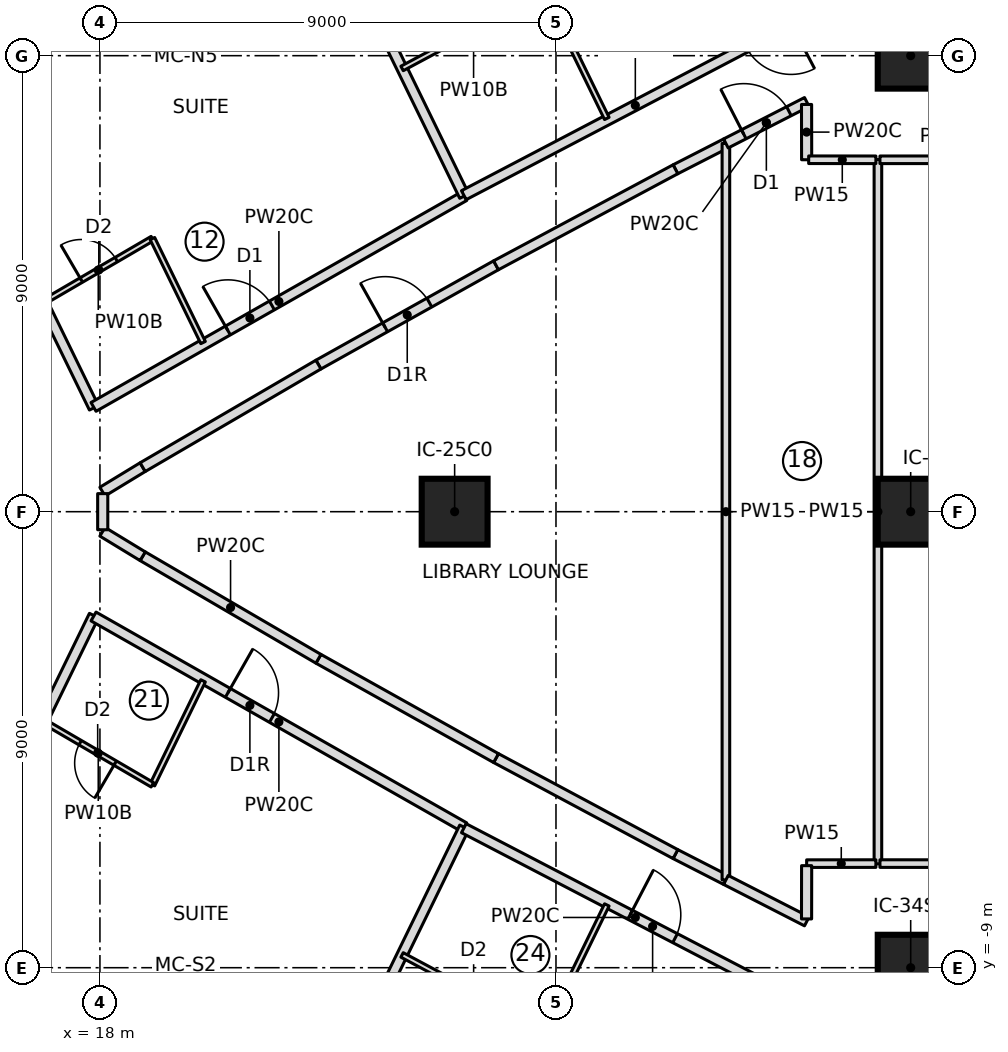
"""IFC4 building model, lengths in metres.
Left out: names, types, materials, properties, quantities, classifications, styles, units other than length and angle.
Written with IfcOpenShell. Run it as: python <this file> out.ifc"""

import sys

from ifc_helpers import new_model, si_unit, direction, frame, frame_2d, origin, origin_2d, place, context, subcontext, project, spatial, rectangle, extrude, element, fill, save


model = new_model("IFC4")
c1 = context("Model", 3, precision=1e-05, world=origin(), true_north=direction((0.0, 1.0)))
c2 = subcontext(c1, "Body", "Model", "MODEL_VIEW")
j1 = project(units=[si_unit("LENGTHUNIT", "METRE"), si_unit("PLANEANGLEUNIT", "RADIAN")], contexts=[c1])
p1 = place(None, origin())
s1 = spatial("IfcSite", under=j1, at=p1, CompositionType="ELEMENT")
p2 = place(p1, origin())
s2 = spatial("IfcBuilding", under=s1, at=p2, CompositionType="ELEMENT")
p3 = place(p2, frame((0.0, 0.0, 50.25)))
s3 = spatial("IfcBuildingStorey", under=s2, at=p3, CompositionType="ELEMENT", Elevation=50.25)
for number, where, z_axis, x_axis in (
    (1, (25.0, 0.0, 0.0), (0.0, 0.0, 1.0), (1.0, 0.0, 0.0)),
    (2, (34.0, -9.0, 0.0), (0.0, 0.0, 1.0), (1.0, 0.0, 0.0)),
    (3, (34.0, 0.0, 0.0), (0.0, 0.0, 1.0), (1.0, 0.0, 0.0)),
    (4, (34.0, 9.0, 0.0), (0.0, 0.0, 1.0), (1.0, 0.0, 0.0)),
):
    element("IfcColumn", number, at=place(p3, frame(where, z_axis=z_axis, x_axis=x_axis)), inside=s3, PredefinedType="COLUMN", context=c2, shape_type="SweptSolid", body=[
        extrude(rectangle(XDim=1.3, YDim=1.3, at=origin_2d()), origin(), (0.0, 0.0, 1.0), 3.55),
    ])
p4 = place(p3, frame((17.882, 2.05, 0.0), z_axis=(0.0, 0.0, 1.0), x_axis=(-0.438213564788, 0.898870887078, 0.0)))
e5 = element("IfcWall", 5, at=p4, inside=s3, PredefinedType="PARTITIONING", context=c2, shape_type="SweptSolid", body=[
    extrude(rectangle(XDim=7.625, YDim=0.2, at=frame_2d((3.813, 0.0))), origin(), (0.0, 0.0, 1.0), 3.25),
])
p5 = place(p3, frame((17.874, 2.068, 0.0), z_axis=(0.0, 0.0, 1.0), x_axis=(0.869280098963, 0.494319845391, 0.0)))
e6 = element("IfcWall", 6, at=p5, inside=s3, PredefinedType="PARTITIONING", context=c2, shape_type="SweptSolid", body=[
    extrude(rectangle(XDim=8.417, YDim=0.2, at=frame_2d((4.208, 0.0))), origin(), (0.0, 0.0, 1.0), 3.25),
])
p6 = place(p5, frame((3.05, 0.0, 0.0)))
e7 = element("IfcOpeningElement", 7, at=p6, cuts=e6, PredefinedType="OPENING", context=c2, shape_type="SweptSolid", body=[
    extrude(rectangle(XDim=1.0, YDim=2.1, at=frame_2d((0.5, 1.05))), frame((0.0, 0.11, 0.0), z_axis=(0.0, -1.0, 0.0), x_axis=(1.0, 0.0, 0.0)), (0.0, 0.0, 1.0), 0.22),
])
p7 = place(p3, frame((16.898, 4.144, 0.0), z_axis=(0.0, 0.0, 1.0), x_axis=(0.863707305865, 0.503993739837, 0.0)))
e8 = element("IfcWall", 8, at=p7, inside=s3, PredefinedType="PARTITIONING", context=c2, shape_type="SweptSolid", body=[
    extrude(rectangle(XDim=2.474, YDim=0.1, at=frame_2d((1.237, 0.0))), origin(), (0.0, 0.0, 1.0), 3.25),
])
p8 = place(p7, frame((0.85, 0.0, 0.0)))
e9 = element("IfcOpeningElement", 9, at=p8, cuts=e8, PredefinedType="OPENING", context=c2, shape_type="SweptSolid", body=[
    extrude(rectangle(XDim=0.8, YDim=2.1, at=frame_2d((0.4, 1.05))), frame((0.0, 0.06, 0.0), z_axis=(0.0, -1.0, 0.0), x_axis=(1.0, 0.0, 0.0)), (0.0, 0.0, 1.0), 0.12),
])
p9 = place(p3, frame((19.035, 5.39, 0.0), z_axis=(0.0, 0.0, 1.0), x_axis=(0.438122322582, -0.898915363344, 0.0)))
e10 = element("IfcWall", 10, at=p9, inside=s3, PredefinedType="PARTITIONING", context=c2, shape_type="SweptSolid", body=[
    extrude(rectangle(XDim=2.283, YDim=0.1, at=frame_2d((1.142, 0.0))), origin(), (0.0, 0.0, 1.0), 3.25),
])
p10 = place(p3, frame((25.19, 6.229, 0.0), z_axis=(0.0, 0.0, 1.0), x_axis=(-0.438202895602, 0.898876088394, 0.0)))
e11 = element("IfcWall", 11, at=p10, inside=s3, PredefinedType="PARTITIONING", context=c2, shape_type="SweptSolid", body=[
    extrude(rectangle(XDim=7.605, YDim=0.2, at=frame_2d((3.803, 0.0))), origin(), (0.0, 0.0, 1.0), 3.25),
])
p11 = place(p3, frame((31.95, 9.792, 0.0), z_axis=(0.0, 0.0, 1.0), x_axis=(-0.88581965272, -0.464029678851, 0.0)))
e12 = element("IfcWall", 12, at=p11, inside=s3, PredefinedType="PARTITIONING", context=c2, shape_type="SweptSolid", body=[
    extrude(rectangle(XDim=7.641, YDim=0.2, at=frame_2d((3.821, 0.0))), origin(), (0.0, 0.0, 1.0), 3.25),
])
p12 = place(p11, frame((0.35, 0.0, 0.0)))
e13 = element("IfcOpeningElement", 13, at=p12, cuts=e12, PredefinedType="OPENING", context=c2, shape_type="SweptSolid", body=[
    extrude(rectangle(XDim=1.0, YDim=2.1, at=frame_2d((0.5, 1.05))), frame((0.0, 0.11, 0.0), z_axis=(0.0, -1.0, 0.0), x_axis=(1.0, 0.0, 0.0)), (0.0, 0.0, 1.0), 0.22),
])
p13 = place(p3, frame((23.962, 8.748, 0.0), z_axis=(0.0, 0.0, 1.0), x_axis=(0.881653338438, 0.471897648672, 0.0)))
e14 = element("IfcWall", 14, at=p13, inside=s3, PredefinedType="PARTITIONING", context=c2, shape_type="SweptSolid", body=[
    extrude(rectangle(XDim=3.202, YDim=0.1, at=frame_2d((1.601, 0.0))), origin(), (0.0, 0.0, 1.0), 3.25),
])
p14 = place(p13, frame((1.2, 0.0, 0.0)))
e15 = element("IfcOpeningElement", 15, at=p14, cuts=e14, PredefinedType="OPENING", context=c2, shape_type="SweptSolid", body=[
    extrude(rectangle(XDim=0.8, YDim=2.1, at=frame_2d((0.4, 1.05))), frame((0.0, 0.06, 0.0), z_axis=(0.0, -1.0, 0.0), x_axis=(1.0, 0.0, 0.0)), (0.0, 0.0, 1.0), 0.12),
])
p15 = place(p3, frame((26.786, 10.259, 0.0), z_axis=(0.0, 0.0, 1.0), x_axis=(0.43822975423, -0.898862994292, 0.0)))
e16 = element("IfcWall", 16, at=p15, inside=s3, PredefinedType="PARTITIONING", context=c2, shape_type="SweptSolid", body=[
    extrude(rectangle(XDim=2.779, YDim=0.1, at=frame_2d((1.389, 0.0))), origin(), (0.0, 0.0, 1.0), 3.25),
])
p16 = place(p3, frame((14.541, -8.904, 0.0), z_axis=(0.0, 0.0, 1.0), x_axis=(0.438213564788, 0.898870887078, 0.0)))
e17 = element("IfcWall", 17, at=p16, inside=s3, PredefinedType="PARTITIONING", context=c2, shape_type="SweptSolid", body=[
    extrude(rectangle(XDim=7.625, YDim=0.2, at=frame_2d((3.813, 0.0))), origin(), (0.0, 0.0, 1.0), 3.25),
])
p17 = place(p3, frame((17.874, -2.068, 0.0), z_axis=(0.0, 0.0, 1.0), x_axis=(0.869280098963, -0.494319845391, 0.0)))
e18 = element("IfcWall", 18, at=p17, inside=s3, PredefinedType="PARTITIONING", context=c2, shape_type="SweptSolid", body=[
    extrude(rectangle(XDim=8.417, YDim=0.2, at=frame_2d((4.208, 0.0))), origin(), (0.0, 0.0, 1.0), 3.25),
])
p18 = place(p17, frame((3.05, 0.0, 0.0)))
e19 = element("IfcOpeningElement", 19, at=p18, cuts=e18, PredefinedType="OPENING", context=c2, shape_type="SweptSolid", body=[
    extrude(rectangle(XDim=1.0, YDim=2.1, at=frame_2d((0.5, 1.05))), frame((0.0, 0.11, 0.0), z_axis=(0.0, -1.0, 0.0), x_axis=(1.0, 0.0, 0.0)), (0.0, 0.0, 1.0), 0.22),
])
p19 = place(p3, frame((20.035, -3.338, 0.0), z_axis=(0.0, 0.0, 1.0), x_axis=(-0.438122322582, -0.898915363344, 0.0)))
e20 = element("IfcWall", 20, at=p19, inside=s3, PredefinedType="PARTITIONING", context=c2, shape_type="SweptSolid", body=[
    extrude(rectangle(XDim=2.283, YDim=0.1, at=frame_2d((1.142, 0.0))), origin(), (0.0, 0.0, 1.0), 3.25),
])
p20 = place(p3, frame((19.035, -5.39, 0.0), z_axis=(0.0, 0.0, 1.0), x_axis=(-0.863707305865, 0.503993739837, 0.0)))
e21 = element("IfcWall", 21, at=p20, inside=s3, PredefinedType="PARTITIONING", context=c2, shape_type="SweptSolid", body=[
    extrude(rectangle(XDim=2.474, YDim=0.1, at=frame_2d((1.237, 0.0))), origin(), (0.0, 0.0, 1.0), 3.25),
])
p21 = place(p20, frame((0.85, 0.0, 0.0)))
e22 = element("IfcOpeningElement", 22, at=p21, cuts=e21, PredefinedType="OPENING", context=c2, shape_type="SweptSolid", body=[
    extrude(rectangle(XDim=0.8, YDim=2.1, at=frame_2d((0.4, 1.05))), frame((0.0, 0.06, 0.0), z_axis=(0.0, -1.0, 0.0), x_axis=(1.0, 0.0, 0.0)), (0.0, 0.0, 1.0), 0.12),
])
p22 = place(p3, frame((21.857, -13.065, 0.0), z_axis=(0.0, 0.0, 1.0), x_axis=(0.438202895602, 0.898876088394, 0.0)))
e23 = element("IfcWall", 23, at=p22, inside=s3, PredefinedType="PARTITIONING", context=c2, shape_type="SweptSolid", body=[
    extrude(rectangle(XDim=7.605, YDim=0.2, at=frame_2d((3.803, 0.0))), origin(), (0.0, 0.0, 1.0), 3.25),
])
p23 = place(p3, frame((25.181, -6.247, 0.0), z_axis=(0.0, 0.0, 1.0), x_axis=(0.887026569793, -0.461718382221, 0.0)))
e24 = element("IfcWall", 24, at=p23, inside=s3, PredefinedType="PARTITIONING", context=c2, shape_type="SweptSolid", body=[
    extrude(rectangle(XDim=7.631, YDim=0.2, at=frame_2d((3.815, 0.0))), origin(), (0.0, 0.0, 1.0), 3.25),
])
p24 = place(p23, frame((3.7, 0.0, 0.0)))
e25 = element("IfcOpeningElement", 25, at=p24, cuts=e24, PredefinedType="OPENING", context=c2, shape_type="SweptSolid", body=[
    extrude(rectangle(XDim=1.0, YDim=2.1, at=frame_2d((0.5, 1.05))), frame((0.0, 0.11, 0.0), z_axis=(0.0, -1.0, 0.0), x_axis=(1.0, 0.0, 0.0)), (0.0, 0.0, 1.0), 0.22),
])
p25 = place(p3, frame((28.003, -7.761, 0.0), z_axis=(0.0, 0.0, 1.0), x_axis=(-0.43822975423, -0.898862994292, 0.0)))
e26 = element("IfcWall", 26, at=p25, inside=s3, PredefinedType="PARTITIONING", context=c2, shape_type="SweptSolid", body=[
    extrude(rectangle(XDim=2.779, YDim=0.1, at=frame_2d((1.389, 0.0))), origin(), (0.0, 0.0, 1.0), 3.25),
])
p26 = place(p3, frame((26.785, -10.259, 0.0), z_axis=(0.0, 0.0, 1.0), x_axis=(-0.881653338438, 0.471897648672, 0.0)))
e27 = element("IfcWall", 27, at=p26, inside=s3, PredefinedType="PARTITIONING", context=c2, shape_type="SweptSolid", body=[
    extrude(rectangle(XDim=3.202, YDim=0.1, at=frame_2d((1.601, 0.0))), origin(), (0.0, 0.0, 1.0), 3.25),
])
p27 = place(p26, frame((1.2, 0.0, 0.0)))
e28 = element("IfcOpeningElement", 28, at=p27, cuts=e27, PredefinedType="OPENING", context=c2, shape_type="SweptSolid", body=[
    extrude(rectangle(XDim=0.8, YDim=2.1, at=frame_2d((0.4, 1.05))), frame((0.0, 0.06, 0.0), z_axis=(0.0, -1.0, 0.0), x_axis=(1.0, 0.0, 0.0)), (0.0, 0.0, 1.0), 0.12),
])
p28 = place(p3, frame((22.312, 2.903, 0.0), z_axis=(0.0, 0.0, 1.0), x_axis=(0.872800289292, 0.488077509225, 0.0)))
e29 = element("IfcWall", 29, at=p28, inside=s3, PredefinedType="PARTITIONING", context=c2, shape_type="SweptSolid", body=[
    extrude(rectangle(XDim=4.016, YDim=0.2, at=frame_2d((2.008, 0.0))), origin(), (0.0, 0.0, 1.0), 3.25),
])
p29 = place(p28, frame((1.508, 0.0, 0.0)))
e30 = element("IfcOpeningElement", 30, at=p29, cuts=e29, PredefinedType="OPENING", context=c2, shape_type="SweptSolid", body=[
    extrude(rectangle(XDim=1.0, YDim=2.1, at=frame_2d((0.5, 1.05))), frame((0.0, 0.11, 0.0), z_axis=(0.0, -1.0, 0.0), x_axis=(1.0, 0.0, 0.0)), (0.0, 0.0, 1.0), 0.22),
])
for number, where, z_axis, x_axis in (
    (31, (29.357, 6.758, 0.0), (0.0, 0.0, 1.0), (0.89, 0.455, 0.0)),
    (32, (30.353, -7.268, 0.0), (0.0, 0.0, 1.0), (-0.89, 0.455, 0.0)),
):
    element("IfcWall", number, at=place(p3, frame(where, z_axis=z_axis, x_axis=x_axis)), inside=s3, PredefinedType="PARTITIONING", context=c2, shape_type="SweptSolid", body=[
        extrude(rectangle(XDim=1.119, YDim=0.2, at=frame_2d((0.559, 0.0))), origin(), (0.0, 0.0, 1.0), 3.25),
    ])
p30 = place(p3, frame((29.357, -6.758, 0.0), z_axis=(0.0, 0.0, 1.0), x_axis=(-0.881655245922, 0.471894084874, 0.0)))
e33 = element("IfcWall", 33, at=p30, inside=s3, PredefinedType="PARTITIONING", context=c2, shape_type="SweptSolid", body=[
    extrude(rectangle(XDim=4.016, YDim=0.2, at=frame_2d((2.008, 0.0))), origin(), (0.0, 0.0, 1.0), 3.25),
])
p31 = place(p3, frame((25.817, -4.863, 0.0), z_axis=(0.0, 0.0, 1.0), x_axis=(-0.872800289292, 0.488077509225, 0.0)))
e34 = element("IfcWall", 34, at=p31, inside=s3, PredefinedType="PARTITIONING", context=c2, shape_type="SweptSolid", body=[
    extrude(rectangle(XDim=4.016, YDim=0.2, at=frame_2d((2.008, 0.0))), origin(), (0.0, 0.0, 1.0), 3.25),
])
p32 = place(p3, frame((22.312, -2.903, 0.0), z_axis=(0.0, 0.0, 1.0), x_axis=(-0.863710538269, 0.503988200341, 0.0)))
e35 = element("IfcWall", 35, at=p32, inside=s3, PredefinedType="PARTITIONING", context=c2, shape_type="SweptSolid", body=[
    extrude(rectangle(XDim=4.016, YDim=0.2, at=frame_2d((2.008, 0.0))), origin(), (0.0, 0.0, 1.0), 3.25),
])
for number, where, z_axis, x_axis in (
    (36, (18.844, -0.879, 0.0), (0.0, 0.0, 1.0), (-0.854, 0.52, 0.0)),
    (37, (18.05, 0.396, 0.0), (0.0, 0.0, 1.0), (0.854, 0.52, 0.0)),
):
    element("IfcWall", number, at=place(p3, frame(where, z_axis=z_axis, x_axis=x_axis)), inside=s3, PredefinedType="PARTITIONING", context=c2, shape_type="SweptSolid", body=[
        extrude(rectangle(XDim=0.929, YDim=0.2, at=frame_2d((0.464, 0.0))), origin(), (0.0, 0.0, 1.0), 3.25),
    ])
for number, where, z_axis, x_axis in (
    (38, (18.844, 0.879, 0.0), (0.0, 0.0, 1.0), (0.864, 0.504, 0.0)),
    (39, (25.817, 4.863, 0.0), (0.0, 0.0, 1.0), (0.882, 0.472, 0.0)),
):
    element("IfcWall", number, at=place(p3, frame(where, z_axis=z_axis, x_axis=x_axis)), inside=s3, PredefinedType="PARTITIONING", context=c2, shape_type="SweptSolid", body=[
        extrude(rectangle(XDim=4.016, YDim=0.2, at=frame_2d((2.008, 0.0))), origin(), (0.0, 0.0, 1.0), 3.25),
    ])
p33 = place(p3, frame((30.353, -7.268, 0.0), z_axis=(0.0, 0.0, 1.0), x_axis=(0.0, 1.0, 0.0)))
e40 = element("IfcWall", 40, at=p33, inside=s3, PredefinedType="PARTITIONING", context=c2, shape_type="SweptSolid", body=[
    extrude(rectangle(XDim=14.535, YDim=0.15, at=frame_2d((7.268, 0.0))), origin(), (0.0, 0.0, 1.0), 3.25),
])
p34 = place(p3, frame((30.353, 7.268, 0.0), z_axis=(0.0, 0.0, 1.0), x_axis=(0.890195531144, 0.455578660969, 0.0)))
e41 = element("IfcWall", 41, at=p34, inside=s3, PredefinedType="PARTITIONING", context=c2, shape_type="SweptSolid", body=[
    extrude(rectangle(XDim=1.794, YDim=0.2, at=frame_2d((0.897, 0.0))), origin(), (0.0, 0.0, 1.0), 3.25),
])
p35 = place(p34, frame((0.397, 0.0, 0.0)))
e42 = element("IfcOpeningElement", 42, at=p35, cuts=e41, PredefinedType="OPENING", context=c2, shape_type="SweptSolid", body=[
    extrude(rectangle(XDim=1.0, YDim=2.1, at=frame_2d((0.5, 1.05))), frame((0.0, 0.11, 0.0), z_axis=(0.0, -1.0, 0.0), x_axis=(1.0, 0.0, 0.0)), (0.0, 0.0, 1.0), 0.22),
])
p36 = place(p3, frame((31.95, -8.085, 0.0), z_axis=(0.0, 0.0, 1.0), x_axis=(-0.890195531144, 0.455578660969, 0.0)))
e43 = element("IfcWall", 43, at=p36, inside=s3, PredefinedType="PARTITIONING", context=c2, shape_type="SweptSolid", body=[
    extrude(rectangle(XDim=1.794, YDim=0.2, at=frame_2d((0.897, 0.0))), origin(), (0.0, 0.0, 1.0), 3.25),
])
p37 = place(p3, frame((33.353, -6.95, 0.0), z_axis=(0.0, 0.0, 1.0), x_axis=(0.0, 1.0, 0.0)))
e44 = element("IfcWall", 44, at=p37, inside=s3, PredefinedType="PARTITIONING", context=c2, shape_type="SweptSolid", body=[
    extrude(rectangle(XDim=13.9, YDim=0.15, at=frame_2d((6.95, 0.0))), origin(), (0.0, 0.0, 1.0), 3.25),
])
p38 = place(p3, frame((18.055, -0.357, 0.0), z_axis=(0.0, 0.0, 1.0), x_axis=(0.0, 1.0, 0.0)))
e45 = element("IfcWall", 45, at=p38, inside=s3, PredefinedType="PARTITIONING", context=c2, shape_type="SweptSolid", body=[
    extrude(rectangle(XDim=0.713, YDim=0.2, at=frame_2d((0.357, 0.0))), origin(), (0.0, 0.0, 1.0), 3.25),
])
p39 = place(p3, frame((33.313, -6.945, 0.0), z_axis=(0.0, 0.0, 1.0), x_axis=(-0.999999744625, -0.00071466839, 0.0)))
e46 = element("IfcWall", 46, at=p39, inside=s3, PredefinedType="PARTITIONING", context=c2, shape_type="SweptSolid", body=[
    extrude(rectangle(XDim=1.366, YDim=0.15, at=frame_2d((0.683, 0.0))), origin(), (0.0, 0.0, 1.0), 3.25),
])
p40 = place(p3, frame((31.947, -6.986, 0.0), z_axis=(0.0, 0.0, 1.0), x_axis=(-0.001625636496, -0.999998678652, 0.0)))
e47 = element("IfcWall", 47, at=p40, inside=s3, PredefinedType="PARTITIONING", context=c2, shape_type="SweptSolid", body=[
    extrude(rectangle(XDim=1.051, YDim=0.2, at=frame_2d((0.526, 0.0))), origin(), (0.0, 0.0, 1.0), 3.25),
])
p41 = place(p3, frame((31.945, 8.037, 0.0), z_axis=(0.0, 0.0, 1.0), x_axis=(0.001565993606, -0.999998773831, 0.0)))
e48 = element("IfcWall", 48, at=p41, inside=s3, PredefinedType="PARTITIONING", context=c2, shape_type="SweptSolid", body=[
    extrude(rectangle(XDim=1.091, YDim=0.2, at=frame_2d((0.546, 0.0))), origin(), (0.0, 0.0, 1.0), 3.25),
])
p42 = place(p3, frame((31.987, 6.946, 0.0), z_axis=(0.0, 0.0, 1.0), x_axis=(0.999999728974, -0.000736241288, 0.0)))
e49 = element("IfcWall", 49, at=p42, inside=s3, PredefinedType="PARTITIONING", context=c2, shape_type="SweptSolid", body=[
    extrude(rectangle(XDim=1.326, YDim=0.15, at=frame_2d((0.663, 0.0))), origin(), (0.0, 0.0, 1.0), 3.25),
])
p43 = place(p3, frame((36.013, -6.946, 0.0), z_axis=(0.0, 0.0, 1.0), x_axis=(-0.999999930528, 0.000372751815, 0.0)))
e50 = element("IfcWall", 50, at=p43, inside=s3, PredefinedType="PARTITIONING", context=c2, shape_type="SweptSolid", body=[
    extrude(rectangle(XDim=2.62, YDim=0.15, at=frame_2d((1.31, 0.0))), origin(), (0.0, 0.0, 1.0), 3.25),
])
p44 = place(p3, frame((33.393, 6.945, 0.0), z_axis=(0.0, 0.0, 1.0), x_axis=(0.999999932604, 0.000367140866, 0.0)))
e51 = element("IfcWall", 51, at=p44, inside=s3, PredefinedType="PARTITIONING", context=c2, shape_type="SweptSolid", body=[
    extrude(rectangle(XDim=2.66, YDim=0.15, at=frame_2d((1.33, 0.0))), origin(), (0.0, 0.0, 1.0), 3.25),
])
p45 = place(p8, origin())
e52 = element("IfcDoor", 52, at=p45, inside=s3, OperationType="SINGLE_SWING_LEFT", PredefinedType="DOOR", context=c2, shape_type="SweptSolid", body=[
    extrude(rectangle(XDim=0.8, YDim=2.1, at=frame_2d((0.4, 1.05))), frame((0.0, 0.025, 0.0), z_axis=(0.0, -1.0, 0.0), x_axis=(1.0, 0.0, 0.0)), (0.0, 0.0, 1.0), 0.05),
])
fill(e9, e52)
p46 = place(p6, origin())
e53 = element("IfcDoor", 53, at=p46, inside=s3, OperationType="SINGLE_SWING_LEFT", PredefinedType="DOOR", context=c2, shape_type="SweptSolid", body=[
    extrude(rectangle(XDim=1.0, YDim=2.1, at=frame_2d((0.5, 1.05))), frame((0.0, 0.025, 0.0), z_axis=(0.0, -1.0, 0.0), x_axis=(1.0, 0.0, 0.0)), (0.0, 0.0, 1.0), 0.05),
])
fill(e7, e53)
p47 = place(p21, origin())
e54 = element("IfcDoor", 54, at=p47, inside=s3, OperationType="SINGLE_SWING_LEFT", PredefinedType="DOOR", context=c2, shape_type="SweptSolid", body=[
    extrude(rectangle(XDim=0.8, YDim=2.1, at=frame_2d((0.4, 1.05))), frame((0.0, 0.025, 0.0), z_axis=(0.0, -1.0, 0.0), x_axis=(1.0, 0.0, 0.0)), (0.0, 0.0, 1.0), 0.05),
])
fill(e22, e54)
p48 = place(p18, origin())
e55 = element("IfcDoor", 55, at=p48, inside=s3, OperationType="SINGLE_SWING_RIGHT", PredefinedType="DOOR", context=c2, shape_type="SweptSolid", body=[
    extrude(rectangle(XDim=1.0, YDim=2.1, at=frame_2d((0.5, 1.05))), frame((0.0, 0.025, 0.0), z_axis=(0.0, -1.0, 0.0), x_axis=(1.0, 0.0, 0.0)), (0.0, 0.0, 1.0), 0.05),
])
fill(e19, e55)
p49 = place(p24, origin())
e56 = element("IfcDoor", 56, at=p49, inside=s3, OperationType="SINGLE_SWING_RIGHT", PredefinedType="DOOR", context=c2, shape_type="SweptSolid", body=[
    extrude(rectangle(XDim=1.0, YDim=2.1, at=frame_2d((0.5, 1.05))), frame((0.0, 0.025, 0.0), z_axis=(0.0, -1.0, 0.0), x_axis=(1.0, 0.0, 0.0)), (0.0, 0.0, 1.0), 0.05),
])
fill(e25, e56)
p50 = place(p29, origin())
e57 = element("IfcDoor", 57, at=p50, inside=s3, OperationType="SINGLE_SWING_RIGHT", PredefinedType="DOOR", context=c2, shape_type="SweptSolid", body=[
    extrude(rectangle(XDim=1.0, YDim=2.1, at=frame_2d((0.5, 1.05))), frame((0.0, 0.025, 0.0), z_axis=(0.0, -1.0, 0.0), x_axis=(1.0, 0.0, 0.0)), (0.0, 0.0, 1.0), 0.05),
])
fill(e30, e57)
p51 = place(p35, origin())
e58 = element("IfcDoor", 58, at=p51, inside=s3, OperationType="SINGLE_SWING_LEFT", PredefinedType="DOOR", context=c2, shape_type="SweptSolid", body=[
    extrude(rectangle(XDim=1.0, YDim=2.1, at=frame_2d((0.5, 1.05))), frame((0.0, 0.025, 0.0), z_axis=(0.0, -1.0, 0.0), x_axis=(1.0, 0.0, 0.0)), (0.0, 0.0, 1.0), 0.05),
])
fill(e42, e58)
save(model, sys.argv[1])
